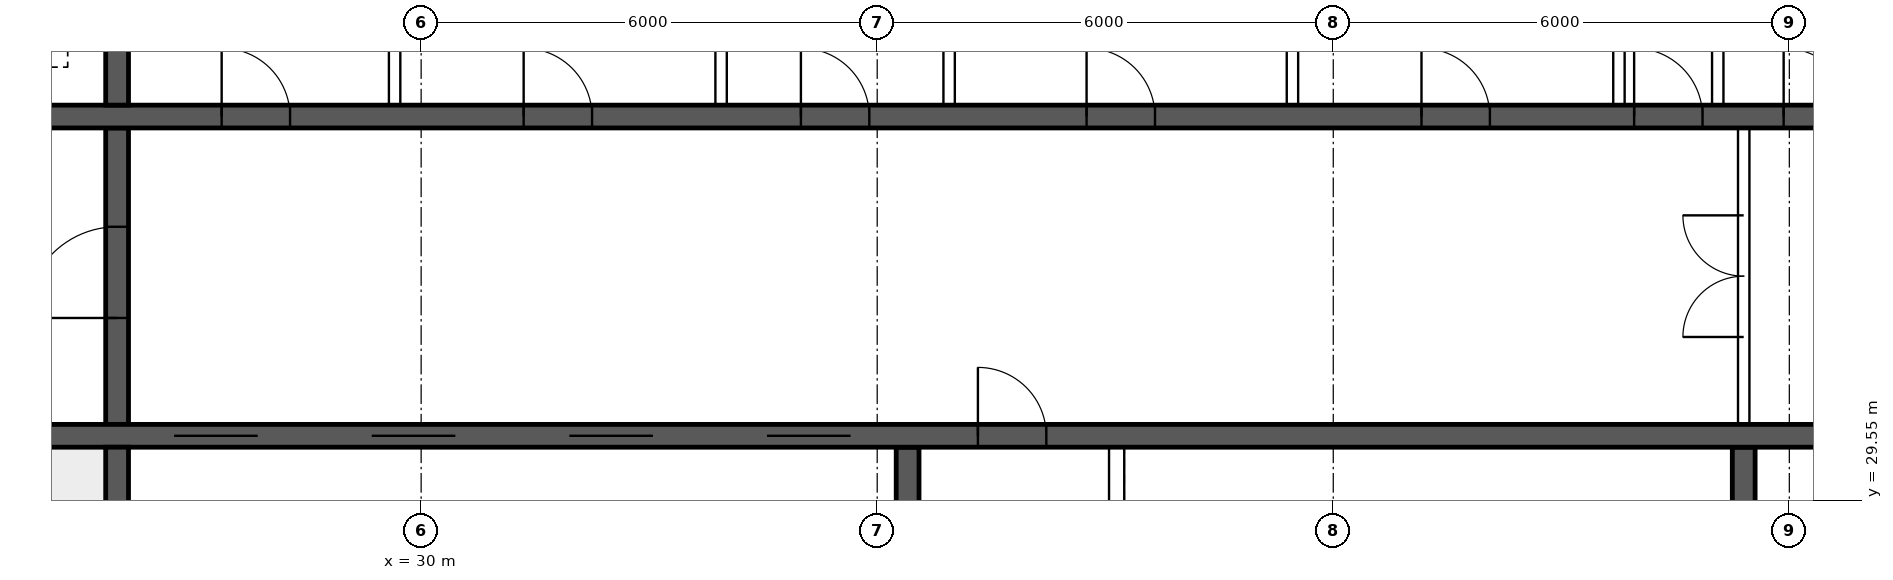
"""IFC4 building model, lengths in metres.
Left out: names, types, materials, properties, quantities, classifications, styles, units other than length and angle.
Written with IfcOpenShell. Run it as: python <this file> out.ifc"""

import sys

from ifc_helpers import new_model, si_unit, direction, frame, frame_2d, origin, place, context, subcontext, project, spatial, rectangle, extrude, element, fill, save


model = new_model("IFC4")
c1 = context("Model", 3, precision=1e-05, world=origin(), true_north=direction((0.0, 1.0)))
c2 = subcontext(c1, "Body", "Model", "MODEL_VIEW")
j1 = project(units=[si_unit("LENGTHUNIT", "METRE"), si_unit("PLANEANGLEUNIT", "RADIAN")], contexts=[c1])
p1 = place(None, origin())
s1 = spatial("IfcSite", under=j1, at=p1, CompositionType="ELEMENT")
p2 = place(p1, origin())
s2 = spatial("IfcBuilding", under=s1, at=p2, CompositionType="ELEMENT")
p3 = place(p2, frame((0.0, 0.0, 125.65)))
s3 = spatial("IfcBuildingStorey", under=s2, at=p3, CompositionType="ELEMENT", Elevation=125.65)
p4 = place(p3, frame((18.475, 30.4, 0.0), z_axis=(0.0, 0.0, 1.0), x_axis=(1.0, 0.0, 0.0)))
e1 = element("IfcWall", 1, at=p4, inside=s3, PredefinedType="SHEAR", context=c2, shape_type="SweptSolid", body=[
    extrude(rectangle(XDim=47.05, YDim=0.3, at=frame_2d((23.525, 0.0))), origin(), (0.0, 0.0, 1.0), 3.75),
])
p5 = place(p4, frame((0.4, 0.0, 0.0)))
e2 = element("IfcOpeningElement", 2, at=p5, cuts=e1, PredefinedType="OPENING", context=c2, shape_type="SweptSolid", body=[
    extrude(rectangle(XDim=1.0, YDim=2.1, at=frame_2d((0.5, 1.05))), frame((0.0, 0.16, 0.0), z_axis=(0.0, -1.0, 0.0), x_axis=(1.0, 0.0, 0.0)), (0.0, 0.0, 1.0), 0.32),
])
p6 = place(p4, frame((45.65, 0.0, 0.0)))
e3 = element("IfcOpeningElement", 3, at=p6, cuts=e1, PredefinedType="OPENING", context=c2, shape_type="SweptSolid", body=[
    extrude(rectangle(XDim=1.0, YDim=2.1, at=frame_2d((0.5, 1.05))), frame((0.0, 0.16, 0.0), z_axis=(0.0, -1.0, 0.0), x_axis=(1.0, 0.0, 0.0)), (0.0, 0.0, 1.0), 0.32),
])
p7 = place(p4, frame((8.275, 0.0, 0.0)))
e4 = element("IfcOpeningElement", 4, at=p7, cuts=e1, PredefinedType="OPENING", context=c2, shape_type="SweptSolid", body=[
    extrude(rectangle(XDim=1.1, YDim=2.1, at=frame_2d((0.55, 1.05))), frame((0.0, 0.16, 0.0), z_axis=(0.0, -1.0, 0.0), x_axis=(1.0, 0.0, 0.0)), (0.0, 0.0, 1.0), 0.32),
])
p8 = place(p4, frame((10.875, 0.0, 0.0)))
e5 = element("IfcOpeningElement", 5, at=p8, cuts=e1, PredefinedType="OPENING", context=c2, shape_type="SweptSolid", body=[
    extrude(rectangle(XDim=1.1, YDim=2.1, at=frame_2d((0.55, 1.05))), frame((0.0, 0.16, 0.0), z_axis=(0.0, -1.0, 0.0), x_axis=(1.0, 0.0, 0.0)), (0.0, 0.0, 1.0), 0.32),
])
p9 = place(p4, frame((13.475, 0.0, 0.0)))
e6 = element("IfcOpeningElement", 6, at=p9, cuts=e1, PredefinedType="OPENING", context=c2, shape_type="SweptSolid", body=[
    extrude(rectangle(XDim=1.1, YDim=2.1, at=frame_2d((0.55, 1.05))), frame((0.0, 0.16, 0.0), z_axis=(0.0, -1.0, 0.0), x_axis=(1.0, 0.0, 0.0)), (0.0, 0.0, 1.0), 0.32),
])
p10 = place(p4, frame((16.075, 0.0, 0.0)))
e7 = element("IfcOpeningElement", 7, at=p10, cuts=e1, PredefinedType="OPENING", context=c2, shape_type="SweptSolid", body=[
    extrude(rectangle(XDim=1.1, YDim=2.1, at=frame_2d((0.55, 1.05))), frame((0.0, 0.16, 0.0), z_axis=(0.0, -1.0, 0.0), x_axis=(1.0, 0.0, 0.0)), (0.0, 0.0, 1.0), 0.32),
])
p11 = place(p4, frame((18.85, 0.0, 0.0)))
e8 = element("IfcOpeningElement", 8, at=p11, cuts=e1, PredefinedType="OPENING", context=c2, shape_type="SweptSolid", body=[
    extrude(rectangle(XDim=0.9, YDim=2.1, at=frame_2d((0.45, 1.05))), frame((0.0, 0.16, 0.0), z_axis=(0.0, -1.0, 0.0), x_axis=(1.0, 0.0, 0.0)), (0.0, 0.0, 1.0), 0.32),
])
p12 = place(p4, frame((30.142, 0.0, 0.0)))
e9 = element("IfcOpeningElement", 9, at=p12, cuts=e1, PredefinedType="OPENING", context=c2, shape_type="SweptSolid", body=[
    extrude(rectangle(XDim=1.1, YDim=2.1, at=frame_2d((0.55, 1.05))), frame((0.0, 0.16, 0.0), z_axis=(0.0, -1.0, 0.0), x_axis=(1.0, 0.0, 0.0)), (0.0, 0.0, 1.0), 0.32),
])
p13 = place(p4, frame((33.675, 0.0, 0.0)))
e10 = element("IfcOpeningElement", 10, at=p13, cuts=e1, PredefinedType="OPENING", context=c2, shape_type="SweptSolid", body=[
    extrude(rectangle(XDim=1.1, YDim=2.1, at=frame_2d((0.55, 1.05))), frame((0.0, 0.16, 0.0), z_axis=(0.0, -1.0, 0.0), x_axis=(1.0, 0.0, 0.0)), (0.0, 0.0, 1.0), 0.32),
])
p14 = place(p4, frame((37.208, 0.0, 0.0)))
e11 = element("IfcOpeningElement", 11, at=p14, cuts=e1, PredefinedType="OPENING", context=c2, shape_type="SweptSolid", body=[
    extrude(rectangle(XDim=1.1, YDim=2.1, at=frame_2d((0.55, 1.05))), frame((0.0, 0.16, 0.0), z_axis=(0.0, -1.0, 0.0), x_axis=(1.0, 0.0, 0.0)), (0.0, 0.0, 1.0), 0.32),
])
p15 = place(p3, frame((18.475, 34.6, 0.0), z_axis=(0.0, 0.0, 1.0), x_axis=(1.0, 0.0, 0.0)))
e12 = element("IfcWall", 12, at=p15, inside=s3, PredefinedType="SHEAR", context=c2, shape_type="SweptSolid", body=[
    extrude(rectangle(XDim=47.05, YDim=0.3, at=frame_2d((23.525, 0.0))), origin(), (0.0, 0.0, 1.0), 3.75),
])
p16 = place(p15, frame((0.9, 0.0, 0.0)))
e13 = element("IfcOpeningElement", 13, at=p16, cuts=e12, PredefinedType="OPENING", context=c2, shape_type="SweptSolid", body=[
    extrude(rectangle(XDim=1.1, YDim=2.1, at=frame_2d((0.55, 1.05))), frame((0.0, 0.16, 0.0), z_axis=(0.0, -1.0, 0.0), x_axis=(1.0, 0.0, 0.0)), (0.0, 0.0, 1.0), 0.32),
])
p17 = place(p15, frame((45.05, 0.0, 0.0)))
e14 = element("IfcOpeningElement", 14, at=p17, cuts=e12, PredefinedType="OPENING", context=c2, shape_type="SweptSolid", body=[
    extrude(rectangle(XDim=1.1, YDim=2.1, at=frame_2d((0.55, 1.05))), frame((0.0, 0.16, 0.0), z_axis=(0.0, -1.0, 0.0), x_axis=(1.0, 0.0, 0.0)), (0.0, 0.0, 1.0), 0.32),
])
p18 = place(p15, frame((4.125, 0.0, 0.0)))
e15 = element("IfcOpeningElement", 15, at=p18, cuts=e12, PredefinedType="OPENING", context=c2, shape_type="SweptSolid", body=[
    extrude(rectangle(XDim=0.9, YDim=2.1, at=frame_2d((0.45, 1.05))), frame((0.0, 0.16, 0.0), z_axis=(0.0, -1.0, 0.0), x_axis=(1.0, 0.0, 0.0)), (0.0, 0.0, 1.0), 0.32),
])
p19 = place(p15, frame((42.025, 0.0, 0.0)))
e16 = element("IfcOpeningElement", 16, at=p19, cuts=e12, PredefinedType="OPENING", context=c2, shape_type="SweptSolid", body=[
    extrude(rectangle(XDim=0.9, YDim=2.1, at=frame_2d((0.45, 1.05))), frame((0.0, 0.16, 0.0), z_axis=(0.0, -1.0, 0.0), x_axis=(1.0, 0.0, 0.0)), (0.0, 0.0, 1.0), 0.32),
])
p20 = place(p15, frame((8.9, 0.0, 0.0)))
e17 = element("IfcOpeningElement", 17, at=p20, cuts=e12, PredefinedType="OPENING", context=c2, shape_type="SweptSolid", body=[
    extrude(rectangle(XDim=0.9, YDim=2.1, at=frame_2d((0.45, 1.05))), frame((0.0, 0.16, 0.0), z_axis=(0.0, -1.0, 0.0), x_axis=(1.0, 0.0, 0.0)), (0.0, 0.0, 1.0), 0.32),
])
p21 = place(p15, frame((12.874, 0.0, 0.0)))
e18 = element("IfcOpeningElement", 18, at=p21, cuts=e12, PredefinedType="OPENING", context=c2, shape_type="SweptSolid", body=[
    extrude(rectangle(XDim=0.9, YDim=2.1, at=frame_2d((0.45, 1.05))), frame((0.0, 0.16, 0.0), z_axis=(0.0, -1.0, 0.0), x_axis=(1.0, 0.0, 0.0)), (0.0, 0.0, 1.0), 0.32),
])
p22 = place(p15, frame((16.521, 0.0, 0.0)))
e19 = element("IfcOpeningElement", 19, at=p22, cuts=e12, PredefinedType="OPENING", context=c2, shape_type="SweptSolid", body=[
    extrude(rectangle(XDim=0.9, YDim=2.1, at=frame_2d((0.45, 1.05))), frame((0.0, 0.16, 0.0), z_axis=(0.0, -1.0, 0.0), x_axis=(1.0, 0.0, 0.0)), (0.0, 0.0, 1.0), 0.32),
])
p23 = place(p15, frame((20.28, 0.0, 0.0)))
e20 = element("IfcOpeningElement", 20, at=p23, cuts=e12, PredefinedType="OPENING", context=c2, shape_type="SweptSolid", body=[
    extrude(rectangle(XDim=0.9, YDim=2.1, at=frame_2d((0.45, 1.05))), frame((0.0, 0.16, 0.0), z_axis=(0.0, -1.0, 0.0), x_axis=(1.0, 0.0, 0.0)), (0.0, 0.0, 1.0), 0.32),
])
p24 = place(p15, frame((24.686, 0.0, 0.0)))
e21 = element("IfcOpeningElement", 21, at=p24, cuts=e12, PredefinedType="OPENING", context=c2, shape_type="SweptSolid", body=[
    extrude(rectangle(XDim=0.9, YDim=2.1, at=frame_2d((0.45, 1.05))), frame((0.0, 0.16, 0.0), z_axis=(0.0, -1.0, 0.0), x_axis=(1.0, 0.0, 0.0)), (0.0, 0.0, 1.0), 0.32),
])
p25 = place(p15, frame((27.483, 0.0, 0.0)))
e22 = element("IfcOpeningElement", 22, at=p25, cuts=e12, PredefinedType="OPENING", context=c2, shape_type="SweptSolid", body=[
    extrude(rectangle(XDim=0.9, YDim=2.1, at=frame_2d((0.45, 1.05))), frame((0.0, 0.16, 0.0), z_axis=(0.0, -1.0, 0.0), x_axis=(1.0, 0.0, 0.0)), (0.0, 0.0, 1.0), 0.32),
])
p26 = place(p15, frame((29.45, 0.0, 0.0)))
e23 = element("IfcOpeningElement", 23, at=p26, cuts=e12, PredefinedType="OPENING", context=c2, shape_type="SweptSolid", body=[
    extrude(rectangle(XDim=0.9, YDim=2.1, at=frame_2d((0.45, 1.05))), frame((0.0, 0.16, 0.0), z_axis=(0.0, -1.0, 0.0), x_axis=(1.0, 0.0, 0.0)), (0.0, 0.0, 1.0), 0.32),
])
p27 = place(p15, frame((31.882, 0.0, 0.0)))
e24 = element("IfcOpeningElement", 24, at=p27, cuts=e12, PredefinedType="OPENING", context=c2, shape_type="SweptSolid", body=[
    extrude(rectangle(XDim=0.9, YDim=2.1, at=frame_2d((0.45, 1.05))), frame((0.0, 0.16, 0.0), z_axis=(0.0, -1.0, 0.0), x_axis=(1.0, 0.0, 0.0)), (0.0, 0.0, 1.0), 0.32),
])
p28 = place(p15, frame((34.617, 0.0, 0.0)))
e25 = element("IfcOpeningElement", 25, at=p28, cuts=e12, PredefinedType="OPENING", context=c2, shape_type="SweptSolid", body=[
    extrude(rectangle(XDim=0.9, YDim=2.1, at=frame_2d((0.45, 1.05))), frame((0.0, 0.16, 0.0), z_axis=(0.0, -1.0, 0.0), x_axis=(1.0, 0.0, 0.0)), (0.0, 0.0, 1.0), 0.32),
])
p29 = place(p15, frame((37.656, 0.0, 0.0)))
e26 = element("IfcOpeningElement", 26, at=p29, cuts=e12, PredefinedType="OPENING", context=c2, shape_type="SweptSolid", body=[
    extrude(rectangle(XDim=0.9, YDim=2.1, at=frame_2d((0.45, 1.05))), frame((0.0, 0.16, 0.0), z_axis=(0.0, -1.0, 0.0), x_axis=(1.0, 0.0, 0.0)), (0.0, 0.0, 1.0), 0.32),
])
p30 = place(p3, frame((26.0, 26.275, 0.0), z_axis=(0.0, 0.0, 1.0), x_axis=(0.0, 1.0, 0.0)))
e27 = element("IfcWall", 27, at=p30, inside=s3, PredefinedType="SHEAR", context=c2, shape_type="SweptSolid", body=[
    extrude(rectangle(XDim=3.975, YDim=0.3, at=frame_2d((1.988, 0.0))), origin(), (0.0, 0.0, 1.0), 3.75),
])
p31 = place(p3, frame((26.0, 30.55, 0.0), z_axis=(0.0, 0.0, 1.0), x_axis=(0.0, 1.0, 0.0)))
e28 = element("IfcWall", 28, at=p31, inside=s3, PredefinedType="SHEAR", context=c2, shape_type="SweptSolid", body=[
    extrude(rectangle(XDim=3.9, YDim=0.3, at=frame_2d((1.95, 0.0))), origin(), (0.0, 0.0, 1.0), 3.75),
])
p32 = place(p31, frame((1.4, 0.0, 0.0)))
e29 = element("IfcOpeningElement", 29, at=p32, cuts=e28, PredefinedType="OPENING", context=c2, shape_type="SweptSolid", body=[
    extrude(rectangle(XDim=1.2, YDim=2.1, at=frame_2d((0.6, 1.05))), frame((0.0, 0.16, 0.0), z_axis=(0.0, -1.0, 0.0), x_axis=(1.0, 0.0, 0.0)), (0.0, 0.0, 1.0), 0.32),
])
p33 = place(p3, frame((26.0, 34.75, 0.0), z_axis=(0.0, 0.0, 1.0), x_axis=(0.0, 1.0, 0.0)))
e30 = element("IfcWall", 30, at=p33, inside=s3, PredefinedType="SHEAR", context=c2, shape_type="SweptSolid", body=[
    extrude(rectangle(XDim=2.975, YDim=0.3, at=frame_2d((1.488, 0.0))), origin(), (0.0, 0.0, 1.0), 3.75),
])
for number, where, z_axis, x_axis in (
    (31, (36.4, 26.275, 0.0), (0.0, 0.0, 1.0), (0.0, 1.0, 0.0)),
    (32, (47.4, 26.275, 0.0), (0.0, 0.0, 1.0), (0.0, 1.0, 0.0)),
):
    element("IfcWall", number, at=place(p3, frame(where, z_axis=z_axis, x_axis=x_axis)), inside=s3, PredefinedType="SHEAR", context=c2, shape_type="SweptSolid", body=[
        extrude(rectangle(XDim=3.975, YDim=0.3, at=frame_2d((1.988, 0.0))), origin(), (0.0, 0.0, 1.0), 3.75),
    ])
p34 = place(p3, frame((47.4, 30.55, 0.0), z_axis=(0.0, 0.0, 1.0), x_axis=(0.0, 1.0, 0.0)))
e33 = element("IfcWall", 33, at=p34, inside=s3, PredefinedType="SOLIDWALL", context=c2, shape_type="SweptSolid", body=[
    extrude(rectangle(XDim=3.9, YDim=0.15, at=frame_2d((1.95, 0.0))), origin(), (0.0, 0.0, 1.0), 3.5),
])
p35 = place(p34, frame((1.15, 0.0, 0.0)))
e34 = element("IfcOpeningElement", 34, at=p35, cuts=e33, PredefinedType="OPENING", context=c2, shape_type="SweptSolid", body=[
    extrude(rectangle(XDim=1.6, YDim=2.1, at=frame_2d((0.8, 1.05))), frame((0.0, 0.085, 0.0), z_axis=(0.0, -1.0, 0.0), x_axis=(1.0, 0.0, 0.0)), (0.0, 0.0, 1.0), 0.17),
])
for number, where, z_axis, x_axis in (
    (35, (29.651, 34.75, 0.0), (0.0, 0.0, 1.0), (0.0, 1.0, 0.0)),
    (36, (33.946, 34.75, 0.0), (0.0, 0.0, 1.0), (0.0, 1.0, 0.0)),
    (37, (36.946, 34.75, 0.0), (0.0, 0.0, 1.0), (0.0, 1.0, 0.0)),
    (38, (41.463, 34.75, 0.0), (0.0, 0.0, 1.0), (0.0, 1.0, 0.0)),
    (39, (45.758, 34.75, 0.0), (0.0, 0.0, 1.0), (0.0, 1.0, 0.0)),
    (40, (47.058, 34.75, 0.0), (0.0, 0.0, 1.0), (0.0, 1.0, 0.0)),
):
    element("IfcWall", number, at=place(p3, frame(where, z_axis=z_axis, x_axis=x_axis)), inside=s3, PredefinedType="SOLIDWALL", context=c2, shape_type="SweptSolid", body=[
        extrude(rectangle(XDim=2.975, YDim=0.15, at=frame_2d((1.488, 0.0))), origin(), (0.0, 0.0, 1.0), 3.5),
    ])
p36 = place(p3, frame((39.15, 26.275, 0.0), z_axis=(0.0, 0.0, 1.0), x_axis=(0.0, 1.0, 0.0)))
e41 = element("IfcWall", 41, at=p36, inside=s3, PredefinedType="SOLIDWALL", context=c2, shape_type="SweptSolid", body=[
    extrude(rectangle(XDim=3.975, YDim=0.2, at=frame_2d((1.988, 0.0))), origin(), (0.0, 0.0, 1.0), 3.5),
])
p37 = place(p35, origin())
e42 = element("IfcDoor", 42, at=p37, inside=s3, OperationType="DOUBLE_DOOR_SINGLE_SWING", PredefinedType="DOOR", context=c2, shape_type="SweptSolid", body=[
    extrude(rectangle(XDim=1.6, YDim=2.1, at=frame_2d((0.8, 1.05))), frame((0.0, 0.025, 0.0), z_axis=(0.0, -1.0, 0.0), x_axis=(1.0, 0.0, 0.0)), (0.0, 0.0, 1.0), 0.05),
])
fill(e34, e42)
p38 = place(p32, origin())
e43 = element("IfcDoor", 43, at=p38, inside=s3, OperationType="SINGLE_SWING_LEFT", PredefinedType="DOOR", context=c2, shape_type="SweptSolid", body=[
    extrude(rectangle(XDim=1.2, YDim=2.1, at=frame_2d((0.6, 1.05))), frame((0.0, 0.025, 0.0), z_axis=(0.0, -1.0, 0.0), x_axis=(1.0, 0.0, 0.0)), (0.0, 0.0, 1.0), 0.05),
])
fill(e29, e43)
p39 = place(p20, origin())
e44 = element("IfcDoor", 44, at=p39, inside=s3, OperationType="SINGLE_SWING_LEFT", PredefinedType="DOOR", context=c2, shape_type="SweptSolid", body=[
    extrude(rectangle(XDim=0.9, YDim=2.1, at=frame_2d((0.45, 1.05))), frame((0.0, 0.025, 0.0), z_axis=(0.0, -1.0, 0.0), x_axis=(1.0, 0.0, 0.0)), (0.0, 0.0, 1.0), 0.05),
])
fill(e17, e44)
p40 = place(p21, origin())
e45 = element("IfcDoor", 45, at=p40, inside=s3, OperationType="SINGLE_SWING_LEFT", PredefinedType="DOOR", context=c2, shape_type="SweptSolid", body=[
    extrude(rectangle(XDim=0.9, YDim=2.1, at=frame_2d((0.45, 1.05))), frame((0.0, 0.025, 0.0), z_axis=(0.0, -1.0, 0.0), x_axis=(1.0, 0.0, 0.0)), (0.0, 0.0, 1.0), 0.05),
])
fill(e18, e45)
p41 = place(p22, origin())
e46 = element("IfcDoor", 46, at=p41, inside=s3, OperationType="SINGLE_SWING_LEFT", PredefinedType="DOOR", context=c2, shape_type="SweptSolid", body=[
    extrude(rectangle(XDim=0.9, YDim=2.1, at=frame_2d((0.45, 1.05))), frame((0.0, 0.025, 0.0), z_axis=(0.0, -1.0, 0.0), x_axis=(1.0, 0.0, 0.0)), (0.0, 0.0, 1.0), 0.05),
])
fill(e19, e46)
p42 = place(p23, origin())
e47 = element("IfcDoor", 47, at=p42, inside=s3, OperationType="SINGLE_SWING_LEFT", PredefinedType="DOOR", context=c2, shape_type="SweptSolid", body=[
    extrude(rectangle(XDim=0.9, YDim=2.1, at=frame_2d((0.45, 1.05))), frame((0.0, 0.025, 0.0), z_axis=(0.0, -1.0, 0.0), x_axis=(1.0, 0.0, 0.0)), (0.0, 0.0, 1.0), 0.05),
])
fill(e20, e47)
p43 = place(p24, origin())
e48 = element("IfcDoor", 48, at=p43, inside=s3, OperationType="SINGLE_SWING_LEFT", PredefinedType="DOOR", context=c2, shape_type="SweptSolid", body=[
    extrude(rectangle(XDim=0.9, YDim=2.1, at=frame_2d((0.45, 1.05))), frame((0.0, 0.025, 0.0), z_axis=(0.0, -1.0, 0.0), x_axis=(1.0, 0.0, 0.0)), (0.0, 0.0, 1.0), 0.05),
])
fill(e21, e48)
p44 = place(p25, origin())
e49 = element("IfcDoor", 49, at=p44, inside=s3, OperationType="SINGLE_SWING_LEFT", PredefinedType="DOOR", context=c2, shape_type="SweptSolid", body=[
    extrude(rectangle(XDim=0.9, YDim=2.1, at=frame_2d((0.45, 1.05))), frame((0.0, 0.025, 0.0), z_axis=(0.0, -1.0, 0.0), x_axis=(1.0, 0.0, 0.0)), (0.0, 0.0, 1.0), 0.05),
])
fill(e22, e49)
p45 = place(p26, origin())
e50 = element("IfcDoor", 50, at=p45, inside=s3, OperationType="SINGLE_SWING_LEFT", PredefinedType="DOOR", context=c2, shape_type="SweptSolid", body=[
    extrude(rectangle(XDim=0.9, YDim=2.1, at=frame_2d((0.45, 1.05))), frame((0.0, 0.025, 0.0), z_axis=(0.0, -1.0, 0.0), x_axis=(1.0, 0.0, 0.0)), (0.0, 0.0, 1.0), 0.05),
])
fill(e23, e50)
p46 = place(p7, origin())
e51 = element("IfcDoor", 51, at=p46, inside=s3, OperationType="DOUBLE_DOOR_SLIDING", PredefinedType="DOOR", context=c2, shape_type="SweptSolid", body=[
    extrude(rectangle(XDim=1.1, YDim=2.1, at=frame_2d((0.55, 1.05))), frame((0.0, 0.025, 0.0), z_axis=(0.0, -1.0, 0.0), x_axis=(1.0, 0.0, 0.0)), (0.0, 0.0, 1.0), 0.05),
])
fill(e4, e51)
p47 = place(p8, origin())
e52 = element("IfcDoor", 52, at=p47, inside=s3, OperationType="DOUBLE_DOOR_SLIDING", PredefinedType="DOOR", context=c2, shape_type="SweptSolid", body=[
    extrude(rectangle(XDim=1.1, YDim=2.1, at=frame_2d((0.55, 1.05))), frame((0.0, 0.025, 0.0), z_axis=(0.0, -1.0, 0.0), x_axis=(1.0, 0.0, 0.0)), (0.0, 0.0, 1.0), 0.05),
])
fill(e5, e52)
p48 = place(p9, origin())
e53 = element("IfcDoor", 53, at=p48, inside=s3, OperationType="DOUBLE_DOOR_SLIDING", PredefinedType="DOOR", context=c2, shape_type="SweptSolid", body=[
    extrude(rectangle(XDim=1.1, YDim=2.1, at=frame_2d((0.55, 1.05))), frame((0.0, 0.025, 0.0), z_axis=(0.0, -1.0, 0.0), x_axis=(1.0, 0.0, 0.0)), (0.0, 0.0, 1.0), 0.05),
])
fill(e6, e53)
p49 = place(p10, origin())
e54 = element("IfcDoor", 54, at=p49, inside=s3, OperationType="DOUBLE_DOOR_SLIDING", PredefinedType="DOOR", context=c2, shape_type="SweptSolid", body=[
    extrude(rectangle(XDim=1.1, YDim=2.1, at=frame_2d((0.55, 1.05))), frame((0.0, 0.025, 0.0), z_axis=(0.0, -1.0, 0.0), x_axis=(1.0, 0.0, 0.0)), (0.0, 0.0, 1.0), 0.05),
])
fill(e7, e54)
p50 = place(p11, origin())
e55 = element("IfcDoor", 55, at=p50, inside=s3, OperationType="SINGLE_SWING_LEFT", PredefinedType="DOOR", context=c2, shape_type="SweptSolid", body=[
    extrude(rectangle(XDim=0.9, YDim=2.1, at=frame_2d((0.45, 1.05))), frame((0.0, 0.025, 0.0), z_axis=(0.0, -1.0, 0.0), x_axis=(1.0, 0.0, 0.0)), (0.0, 0.0, 1.0), 0.05),
])
fill(e8, e55)
save(model, sys.argv[1])
